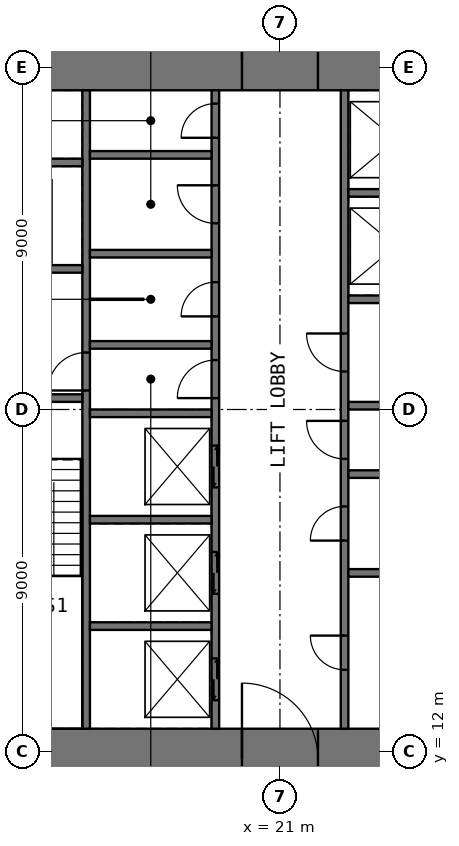
"""IFC4 building model, lengths in metres.
Left out: names, types, materials, properties, quantities, classifications, styles, units other than length and angle.
Written with IfcOpenShell. Run it as: python <this file> out.ifc"""

import sys

from ifc_helpers import new_model, si_unit, direction, frame, frame_2d, origin, place, context, subcontext, project, spatial, rectangle, extrude, element, fill, save


model = new_model("IFC4")
c1 = context("Model", 3, precision=1e-05, world=origin(), true_north=direction((0.0, 1.0)))
c2 = subcontext(c1, "Body", "Model", "MODEL_VIEW")
j1 = project(units=[si_unit("LENGTHUNIT", "METRE"), si_unit("PLANEANGLEUNIT", "RADIAN")], contexts=[c1])
p1 = place(None, origin())
s1 = spatial("IfcSite", under=j1, at=p1, CompositionType="ELEMENT")
p2 = place(p1, origin())
s2 = spatial("IfcBuilding", under=s1, at=p2, CompositionType="ELEMENT")
p3 = place(p2, frame((0.0, 0.0, 104.5)))
s3 = spatial("IfcBuildingStorey", under=s2, at=p3, CompositionType="ELEMENT", Elevation=104.5)
p4 = place(p3, frame((11.0, 11.8, -0.05), z_axis=(0.0, 0.0, 1.0), x_axis=(1.0, 0.0, 0.0)))
e1 = element("IfcWall", 1, at=p4, inside=s3, PredefinedType="SHEAR", context=c2, shape_type="SweptSolid", body=[
    extrude(rectangle(XDim=20.0, YDim=1.6, at=frame_2d((10.0, 0.0))), origin(), (0.0, 0.0, 1.0), 4.0),
])
p5 = place(p4, frame((9.0, 0.0, 0.05)))
e2 = element("IfcOpeningElement", 2, at=p5, cuts=e1, PredefinedType="OPENING", context=c2, shape_type="SweptSolid", body=[
    extrude(rectangle(XDim=2.0, YDim=2.2, at=frame_2d((1.0, 1.1))), frame((0.0, 0.81, 0.0), z_axis=(0.0, -1.0, 0.0), x_axis=(1.0, 0.0, 0.0)), (0.0, 0.0, 1.0), 1.62),
])
p6 = place(p3, frame((11.0, 30.2, -0.05), z_axis=(0.0, 0.0, 1.0), x_axis=(1.0, 0.0, 0.0)))
e3 = element("IfcWall", 3, at=p6, inside=s3, PredefinedType="SHEAR", context=c2, shape_type="SweptSolid", body=[
    extrude(rectangle(XDim=20.0, YDim=1.6, at=frame_2d((10.0, 0.0))), origin(), (0.0, 0.0, 1.0), 4.0),
])
p7 = place(p6, frame((9.0, 0.0, 0.05)))
e4 = element("IfcOpeningElement", 4, at=p7, cuts=e3, PredefinedType="OPENING", context=c2, shape_type="SweptSolid", body=[
    extrude(rectangle(XDim=2.0, YDim=2.2, at=frame_2d((1.0, 1.1))), frame((0.0, 0.81, 0.0), z_axis=(0.0, -1.0, 0.0), x_axis=(1.0, 0.0, 0.0)), (0.0, 0.0, 1.0), 1.62),
])
p8 = place(p3, frame((15.9, 12.6, -0.05), z_axis=(0.0, 0.0, 1.0), x_axis=(0.0, 1.0, 0.0)))
e5 = element("IfcWall", 5, at=p8, inside=s3, PredefinedType="SHEAR", context=c2, shape_type="SweptSolid", body=[
    extrude(rectangle(XDim=16.8, YDim=0.2, at=frame_2d((8.4, 0.0))), origin(), (0.0, 0.0, 1.0), 4.0),
])
p9 = place(p8, frame((8.9, 0.0, 0.05)))
e6 = element("IfcOpeningElement", 6, at=p9, cuts=e5, PredefinedType="OPENING", context=c2, shape_type="SweptSolid", body=[
    extrude(rectangle(XDim=1.0, YDim=2.2, at=frame_2d((0.5, 1.1))), frame((0.0, 0.11, 0.0), z_axis=(0.0, -1.0, 0.0), x_axis=(1.0, 0.0, 0.0)), (0.0, 0.0, 1.0), 0.22),
])
p10 = place(p3, frame((19.3, 12.6, -0.05), z_axis=(0.0, 0.0, 1.0), x_axis=(0.0, 1.0, 0.0)))
e7 = element("IfcWall", 7, at=p10, inside=s3, PredefinedType="SHEAR", context=c2, shape_type="SweptSolid", body=[
    extrude(rectangle(XDim=16.8, YDim=0.2, at=frame_2d((8.4, 0.0))), origin(), (0.0, 0.0, 1.0), 4.0),
])
p11 = place(p10, frame((8.7, 0.0, 0.05)))
e8 = element("IfcOpeningElement", 8, at=p11, cuts=e7, PredefinedType="OPENING", context=c2, shape_type="SweptSolid", body=[
    extrude(rectangle(XDim=1.0, YDim=2.2, at=frame_2d((0.5, 1.1))), frame((0.0, 0.11, 0.0), z_axis=(0.0, -1.0, 0.0), x_axis=(1.0, 0.0, 0.0)), (0.0, 0.0, 1.0), 0.22),
])
p12 = place(p10, frame((10.85, 0.0, 0.05)))
e9 = element("IfcOpeningElement", 9, at=p12, cuts=e7, PredefinedType="OPENING", context=c2, shape_type="SweptSolid", body=[
    extrude(rectangle(XDim=0.9, YDim=2.2, at=frame_2d((0.45, 1.1))), frame((0.0, 0.11, 0.0), z_axis=(0.0, -1.0, 0.0), x_axis=(1.0, 0.0, 0.0)), (0.0, 0.0, 1.0), 0.22),
])
p13 = place(p10, frame((13.3, 0.0, 0.05)))
e10 = element("IfcOpeningElement", 10, at=p13, cuts=e7, PredefinedType="OPENING", context=c2, shape_type="SweptSolid", body=[
    extrude(rectangle(XDim=1.0, YDim=2.2, at=frame_2d((0.5, 1.1))), frame((0.0, 0.11, 0.0), z_axis=(0.0, -1.0, 0.0), x_axis=(1.0, 0.0, 0.0)), (0.0, 0.0, 1.0), 0.22),
])
p14 = place(p10, frame((15.55, 0.0, 0.05)))
e11 = element("IfcOpeningElement", 11, at=p14, cuts=e7, PredefinedType="OPENING", context=c2, shape_type="SweptSolid", body=[
    extrude(rectangle(XDim=0.9, YDim=2.2, at=frame_2d((0.45, 1.1))), frame((0.0, 0.11, 0.0), z_axis=(0.0, -1.0, 0.0), x_axis=(1.0, 0.0, 0.0)), (0.0, 0.0, 1.0), 0.22),
])
p15 = place(p10, frame((0.75, 0.0, 0.05)))
e12 = element("IfcOpeningElement", 12, at=p15, cuts=e7, PredefinedType="OPENING", context=c2, shape_type="SweptSolid", body=[
    extrude(rectangle(XDim=1.1, YDim=2.2, at=frame_2d((0.55, 1.1))), frame((0.0, 0.11, 0.0), z_axis=(0.0, -1.0, 0.0), x_axis=(1.0, 0.0, 0.0)), (0.0, 0.0, 1.0), 0.22),
])
p16 = place(p10, frame((3.55, 0.0, 0.05)))
e13 = element("IfcOpeningElement", 13, at=p16, cuts=e7, PredefinedType="OPENING", context=c2, shape_type="SweptSolid", body=[
    extrude(rectangle(XDim=1.1, YDim=2.2, at=frame_2d((0.55, 1.1))), frame((0.0, 0.11, 0.0), z_axis=(0.0, -1.0, 0.0), x_axis=(1.0, 0.0, 0.0)), (0.0, 0.0, 1.0), 0.22),
])
p17 = place(p10, frame((6.35, 0.0, 0.05)))
e14 = element("IfcOpeningElement", 14, at=p17, cuts=e7, PredefinedType="OPENING", context=c2, shape_type="SweptSolid", body=[
    extrude(rectangle(XDim=1.1, YDim=2.2, at=frame_2d((0.55, 1.1))), frame((0.0, 0.11, 0.0), z_axis=(0.0, -1.0, 0.0), x_axis=(1.0, 0.0, 0.0)), (0.0, 0.0, 1.0), 0.22),
])
p18 = place(p3, frame((22.7, 12.6, -0.05), z_axis=(0.0, 0.0, 1.0), x_axis=(0.0, 1.0, 0.0)))
e15 = element("IfcWall", 15, at=p18, inside=s3, PredefinedType="SHEAR", context=c2, shape_type="SweptSolid", body=[
    extrude(rectangle(XDim=16.8, YDim=0.2, at=frame_2d((8.4, 0.0))), origin(), (0.0, 0.0, 1.0), 4.0),
])
p19 = place(p18, frame((7.1, 0.0, 0.05)))
e16 = element("IfcOpeningElement", 16, at=p19, cuts=e15, PredefinedType="OPENING", context=c2, shape_type="SweptSolid", body=[
    extrude(rectangle(XDim=1.0, YDim=2.2, at=frame_2d((0.5, 1.1))), frame((0.0, 0.11, 0.0), z_axis=(0.0, -1.0, 0.0), x_axis=(1.0, 0.0, 0.0)), (0.0, 0.0, 1.0), 0.22),
])
p20 = place(p18, frame((1.55, 0.0, 0.05)))
e17 = element("IfcOpeningElement", 17, at=p20, cuts=e15, PredefinedType="OPENING", context=c2, shape_type="SweptSolid", body=[
    extrude(rectangle(XDim=0.9, YDim=2.2, at=frame_2d((0.45, 1.1))), frame((0.0, 0.11, 0.0), z_axis=(0.0, -1.0, 0.0), x_axis=(1.0, 0.0, 0.0)), (0.0, 0.0, 1.0), 0.22),
])
p21 = place(p18, frame((4.95, 0.0, 0.05)))
e18 = element("IfcOpeningElement", 18, at=p21, cuts=e15, PredefinedType="OPENING", context=c2, shape_type="SweptSolid", body=[
    extrude(rectangle(XDim=0.9, YDim=2.2, at=frame_2d((0.45, 1.1))), frame((0.0, 0.11, 0.0), z_axis=(0.0, -1.0, 0.0), x_axis=(1.0, 0.0, 0.0)), (0.0, 0.0, 1.0), 0.22),
])
p22 = place(p18, frame((9.4, 0.0, 0.05)))
e19 = element("IfcOpeningElement", 19, at=p22, cuts=e15, PredefinedType="OPENING", context=c2, shape_type="SweptSolid", body=[
    extrude(rectangle(XDim=1.0, YDim=2.2, at=frame_2d((0.5, 1.1))), frame((0.0, 0.11, 0.0), z_axis=(0.0, -1.0, 0.0), x_axis=(1.0, 0.0, 0.0)), (0.0, 0.0, 1.0), 0.22),
])
p23 = place(p3, frame((12.6, 21.3, -0.05), z_axis=(0.0, 0.0, 1.0), x_axis=(1.0, 0.0, 0.0)))
e20 = element("IfcWall", 20, at=p23, inside=s3, PredefinedType="SHEAR", context=c2, shape_type="SweptSolid", body=[
    extrude(rectangle(XDim=3.2, YDim=0.2, at=frame_2d((1.6, 0.0))), origin(), (0.0, 0.0, 1.0), 4.0),
])
p24 = place(p23, frame((1.1, 0.0, 0.05)))
e21 = element("IfcOpeningElement", 21, at=p24, cuts=e20, PredefinedType="OPENING", context=c2, shape_type="SweptSolid", body=[
    extrude(rectangle(XDim=1.0, YDim=2.2, at=frame_2d((0.5, 1.1))), frame((0.0, 0.11, 0.0), z_axis=(0.0, -1.0, 0.0), x_axis=(1.0, 0.0, 0.0)), (0.0, 0.0, 1.0), 0.22),
])
p25 = place(p3, frame((12.6, 24.7, -0.05), z_axis=(0.0, 0.0, 1.0), x_axis=(1.0, 0.0, 0.0)))
e22 = element("IfcWall", 22, at=p25, inside=s3, PredefinedType="SHEAR", context=c2, shape_type="SweptSolid", body=[
    extrude(rectangle(XDim=3.2, YDim=0.2, at=frame_2d((1.6, 0.0))), origin(), (0.0, 0.0, 1.0), 4.0),
])
p26 = place(p25, frame((1.0, 0.0, 0.05)))
e23 = element("IfcOpeningElement", 23, at=p26, cuts=e22, PredefinedType="OPENING", context=c2, shape_type="SweptSolid", body=[
    extrude(rectangle(XDim=1.2, YDim=2.2, at=frame_2d((0.6, 1.1))), frame((0.0, 0.11, 0.0), z_axis=(0.0, -1.0, 0.0), x_axis=(1.0, 0.0, 0.0)), (0.0, 0.0, 1.0), 0.22),
])
for number, where, z_axis, x_axis in (
    (24, (12.6, 27.5, -0.05), (0.0, 0.0, 1.0), (1.0, 0.0, 0.0)),
    (25, (16.0, 15.3, -0.05), (0.0, 0.0, 1.0), (1.0, 0.0, 0.0)),
    (26, (16.0, 18.1, -0.05), (0.0, 0.0, 1.0), (1.0, 0.0, 0.0)),
    (27, (16.0, 20.9, -0.05), (0.0, 0.0, 1.0), (1.0, 0.0, 0.0)),
    (28, (16.0, 22.7, -0.05), (0.0, 0.0, 1.0), (1.0, 0.0, 0.0)),
    (29, (16.0, 25.1, -0.05), (0.0, 0.0, 1.0), (1.0, 0.0, 0.0)),
    (30, (16.0, 27.7, -0.05), (0.0, 0.0, 1.0), (1.0, 0.0, 0.0)),
    (31, (22.8, 16.7, -0.05), (0.0, 0.0, 1.0), (1.0, 0.0, 0.0)),
    (32, (22.8, 19.3, -0.05), (0.0, 0.0, 1.0), (1.0, 0.0, 0.0)),
    (33, (22.8, 21.1, -0.05), (0.0, 0.0, 1.0), (1.0, 0.0, 0.0)),
    (34, (22.8, 23.9, -0.05), (0.0, 0.0, 1.0), (1.0, 0.0, 0.0)),
    (35, (22.8, 26.7, -0.05), (0.0, 0.0, 1.0), (1.0, 0.0, 0.0)),
):
    element("IfcWall", number, at=place(p3, frame(where, z_axis=z_axis, x_axis=x_axis)), inside=s3, PredefinedType="SHEAR", context=c2, shape_type="SweptSolid", body=[
        extrude(rectangle(XDim=3.2, YDim=0.2, at=frame_2d((1.6, 0.0))), origin(), (0.0, 0.0, 1.0), 4.0),
    ])
p27 = place(p3, frame((16.0, 23.9, 0.0), z_axis=(0.0, 0.0, 1.0), x_axis=(1.0, 0.0, 0.0)))
e36 = element("IfcWall", 36, at=p27, inside=s3, PredefinedType="PARTITIONING", context=c2, shape_type="SweptSolid", body=[
    extrude(rectangle(XDim=1.4, YDim=0.03, at=frame_2d((0.7, 0.0))), origin(), (0.0, 0.0, 1.0), 3.75),
])
p28 = place(p5, origin())
e37 = element("IfcDoor", 37, at=p28, inside=s3, OperationType="DOUBLE_DOOR_SINGLE_SWING", PredefinedType="DOOR", context=c2, shape_type="SweptSolid", body=[
    extrude(rectangle(XDim=2.0, YDim=2.2, at=frame_2d((1.0, 1.1))), frame((0.0, 0.025, 0.0), z_axis=(0.0, -1.0, 0.0), x_axis=(1.0, 0.0, 0.0)), (0.0, 0.0, 1.0), 0.05),
])
fill(e2, e37)
p29 = place(p7, origin())
e38 = element("IfcDoor", 38, at=p29, inside=s3, OperationType="DOUBLE_DOOR_SINGLE_SWING", PredefinedType="DOOR", context=c2, shape_type="SweptSolid", body=[
    extrude(rectangle(XDim=2.0, YDim=2.2, at=frame_2d((1.0, 1.1))), frame((0.0, 0.025, 0.0), z_axis=(0.0, -1.0, 0.0), x_axis=(1.0, 0.0, 0.0)), (0.0, 0.0, 1.0), 0.05),
])
fill(e4, e38)
p30 = place(p9, origin())
e39 = element("IfcDoor", 39, at=p30, inside=s3, OperationType="SINGLE_SWING_LEFT", PredefinedType="DOOR", context=c2, shape_type="SweptSolid", body=[
    extrude(rectangle(XDim=1.0, YDim=2.2, at=frame_2d((0.5, 1.1))), frame((0.0, 0.025, 0.0), z_axis=(0.0, -1.0, 0.0), x_axis=(1.0, 0.0, 0.0)), (0.0, 0.0, 1.0), 0.05),
])
fill(e6, e39)
p31 = place(p11, origin())
e40 = element("IfcDoor", 40, at=p31, inside=s3, OperationType="SINGLE_SWING_LEFT", PredefinedType="DOOR", context=c2, shape_type="SweptSolid", body=[
    extrude(rectangle(XDim=1.0, YDim=2.2, at=frame_2d((0.5, 1.1))), frame((0.0, 0.025, 0.0), z_axis=(0.0, -1.0, 0.0), x_axis=(1.0, 0.0, 0.0)), (0.0, 0.0, 1.0), 0.05),
])
fill(e8, e40)
p32 = place(p19, origin())
e41 = element("IfcDoor", 41, at=p32, inside=s3, OperationType="SINGLE_SWING_RIGHT", PredefinedType="DOOR", context=c2, shape_type="SweptSolid", body=[
    extrude(rectangle(XDim=1.0, YDim=2.2, at=frame_2d((0.5, 1.1))), frame((0.0, 0.025, 0.0), z_axis=(0.0, -1.0, 0.0), x_axis=(1.0, 0.0, 0.0)), (0.0, 0.0, 1.0), 0.05),
])
fill(e16, e41)
p33 = place(p12, origin())
e42 = element("IfcDoor", 42, at=p33, inside=s3, OperationType="SINGLE_SWING_LEFT", PredefinedType="DOOR", context=c2, shape_type="SweptSolid", body=[
    extrude(rectangle(XDim=0.9, YDim=2.2, at=frame_2d((0.45, 1.1))), frame((0.0, 0.025, 0.0), z_axis=(0.0, -1.0, 0.0), x_axis=(1.0, 0.0, 0.0)), (0.0, 0.0, 1.0), 0.05),
])
fill(e9, e42)
p34 = place(p13, origin())
e43 = element("IfcDoor", 43, at=p34, inside=s3, OperationType="SINGLE_SWING_RIGHT", PredefinedType="DOOR", context=c2, shape_type="SweptSolid", body=[
    extrude(rectangle(XDim=1.0, YDim=2.2, at=frame_2d((0.5, 1.1))), frame((0.0, 0.025, 0.0), z_axis=(0.0, -1.0, 0.0), x_axis=(1.0, 0.0, 0.0)), (0.0, 0.0, 1.0), 0.05),
])
fill(e10, e43)
p35 = place(p14, origin())
e44 = element("IfcDoor", 44, at=p35, inside=s3, OperationType="SINGLE_SWING_LEFT", PredefinedType="DOOR", context=c2, shape_type="SweptSolid", body=[
    extrude(rectangle(XDim=0.9, YDim=2.2, at=frame_2d((0.45, 1.1))), frame((0.0, 0.025, 0.0), z_axis=(0.0, -1.0, 0.0), x_axis=(1.0, 0.0, 0.0)), (0.0, 0.0, 1.0), 0.05),
])
fill(e11, e44)
p36 = place(p20, origin())
e45 = element("IfcDoor", 45, at=p36, inside=s3, OperationType="SINGLE_SWING_RIGHT", PredefinedType="DOOR", context=c2, shape_type="SweptSolid", body=[
    extrude(rectangle(XDim=0.9, YDim=2.2, at=frame_2d((0.45, 1.1))), frame((0.0, 0.025, 0.0), z_axis=(0.0, -1.0, 0.0), x_axis=(1.0, 0.0, 0.0)), (0.0, 0.0, 1.0), 0.05),
])
fill(e17, e45)
p37 = place(p21, origin())
e46 = element("IfcDoor", 46, at=p37, inside=s3, OperationType="SINGLE_SWING_LEFT", PredefinedType="DOOR", context=c2, shape_type="SweptSolid", body=[
    extrude(rectangle(XDim=0.9, YDim=2.2, at=frame_2d((0.45, 1.1))), frame((0.0, 0.025, 0.0), z_axis=(0.0, -1.0, 0.0), x_axis=(1.0, 0.0, 0.0)), (0.0, 0.0, 1.0), 0.05),
])
fill(e18, e46)
p38 = place(p22, origin())
e47 = element("IfcDoor", 47, at=p38, inside=s3, OperationType="SINGLE_SWING_RIGHT", PredefinedType="DOOR", context=c2, shape_type="SweptSolid", body=[
    extrude(rectangle(XDim=1.0, YDim=2.2, at=frame_2d((0.5, 1.1))), frame((0.0, 0.025, 0.0), z_axis=(0.0, -1.0, 0.0), x_axis=(1.0, 0.0, 0.0)), (0.0, 0.0, 1.0), 0.05),
])
fill(e19, e47)
p39 = place(p15, origin())
e48 = element("IfcDoor", 48, at=p39, inside=s3, OperationType="DOUBLE_DOOR_SLIDING", PredefinedType="DOOR", context=c2, shape_type="SweptSolid", body=[
    extrude(rectangle(XDim=1.1, YDim=2.2, at=frame_2d((0.55, 1.1))), frame((0.0, 0.025, 0.0), z_axis=(0.0, -1.0, 0.0), x_axis=(1.0, 0.0, 0.0)), (0.0, 0.0, 1.0), 0.05),
])
fill(e12, e48)
p40 = place(p16, origin())
e49 = element("IfcDoor", 49, at=p40, inside=s3, OperationType="DOUBLE_DOOR_SLIDING", PredefinedType="DOOR", context=c2, shape_type="SweptSolid", body=[
    extrude(rectangle(XDim=1.1, YDim=2.2, at=frame_2d((0.55, 1.1))), frame((0.0, 0.025, 0.0), z_axis=(0.0, -1.0, 0.0), x_axis=(1.0, 0.0, 0.0)), (0.0, 0.0, 1.0), 0.05),
])
fill(e13, e49)
p41 = place(p17, origin())
e50 = element("IfcDoor", 50, at=p41, inside=s3, OperationType="DOUBLE_DOOR_SLIDING", PredefinedType="DOOR", context=c2, shape_type="SweptSolid", body=[
    extrude(rectangle(XDim=1.1, YDim=2.2, at=frame_2d((0.55, 1.1))), frame((0.0, 0.025, 0.0), z_axis=(0.0, -1.0, 0.0), x_axis=(1.0, 0.0, 0.0)), (0.0, 0.0, 1.0), 0.05),
])
fill(e14, e50)
save(model, sys.argv[1])
